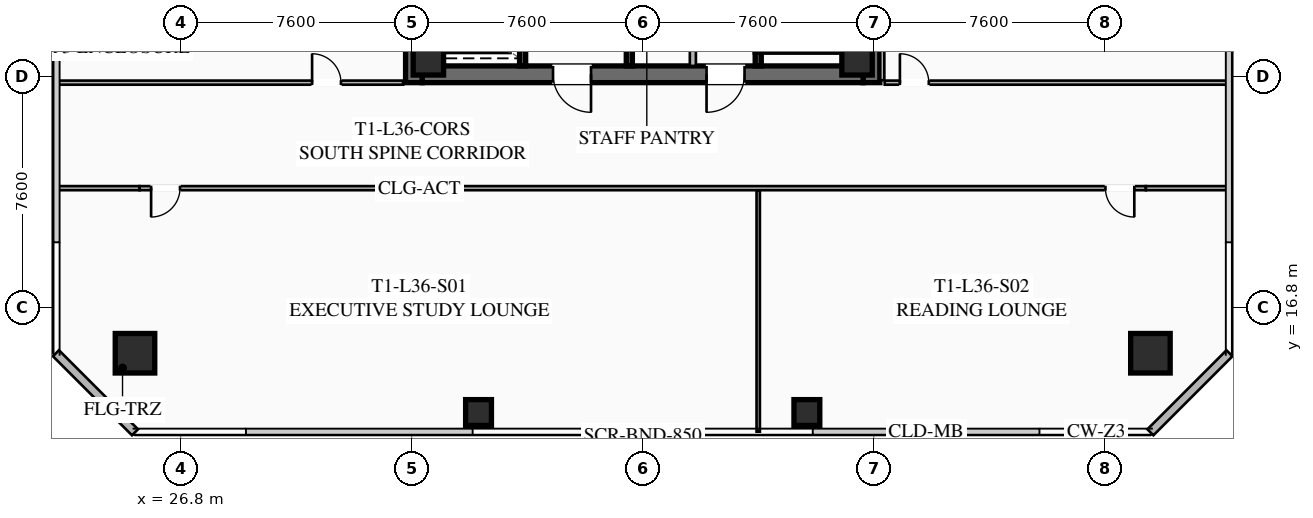
"""IFC4 building model, lengths in metres.
Left out: names, types, materials, properties, quantities, classifications, styles, units other than length and angle.
Written with IfcOpenShell. Run it as: python <this file> out.ifc"""

import sys

from ifc_helpers import new_model, si_unit, direction, frame, frame_2d, origin, origin_2d, place, context, subcontext, project, spatial, rectangle, hollow_rectangle, extrude, element, fill, save


model = new_model("IFC4")
c1 = context("Model", 3, precision=1e-05, world=origin(), true_north=direction((0.0, 1.0)))
c2 = subcontext(c1, "Body", "Model", "MODEL_VIEW")
j1 = project(units=[si_unit("LENGTHUNIT", "METRE"), si_unit("PLANEANGLEUNIT", "RADIAN")], contexts=[c1])
p1 = place(None, origin())
s1 = spatial("IfcSite", under=j1, at=p1, CompositionType="ELEMENT")
p2 = place(p1, origin())
s2 = spatial("IfcBuilding", under=s1, at=p2, CompositionType="ELEMENT")
p3 = place(p2, frame((0.0, 0.0, 135.7)))
s3 = spatial("IfcBuildingStorey", under=s2, at=p3, CompositionType="ELEMENT", Elevation=135.7)
for number, where, z_axis, x_axis in (
    (1, (34.475, 24.2, 0.0), (0.0, 0.0, 1.0), (0.0, 1.0, 0.0)),
    (2, (49.525, 39.8, 0.0), (0.0, 0.0, 1.0), (0.0, -1.0, 0.0)),
):
    element("IfcWall", number, at=place(p3, frame(where, z_axis=z_axis, x_axis=x_axis)), inside=s3, PredefinedType="SHEAR", context=c2, shape_type="SweptSolid", body=[
        extrude(rectangle(XDim=15.6, YDim=0.55, at=frame_2d((7.8, 0.0))), origin(), (0.0, 0.0, 1.0), 3.55),
    ])
p4 = place(p3, frame((49.25, 24.475, 0.0), z_axis=(0.0, 0.0, 1.0), x_axis=(-1.0, 0.0, 0.0)))
e3 = element("IfcWall", 3, at=p4, inside=s3, PredefinedType="SHEAR", context=c2, shape_type="SweptSolid", body=[
    extrude(rectangle(XDim=14.5, YDim=0.55, at=frame_2d((7.25, 0.0))), origin(), (0.0, 0.0, 1.0), 3.55),
])
p5 = place(p4, frame((8.95, 0.0, 0.0)))
e4 = element("IfcOpeningElement", 4, at=p5, cuts=e3, PredefinedType="OPENING", context=c2, shape_type="SweptSolid", body=[
    extrude(rectangle(XDim=1.25, YDim=2.25, at=frame_2d((0.625, 1.125))), frame((0.0, 0.285, 0.0), z_axis=(0.0, -1.0, 0.0), x_axis=(1.0, 0.0, 0.0)), (0.0, 0.0, 1.0), 0.57),
])
p6 = place(p4, frame((3.9, 0.0, 0.0)))
e5 = element("IfcOpeningElement", 5, at=p6, cuts=e3, PredefinedType="OPENING", context=c2, shape_type="SweptSolid", body=[
    extrude(rectangle(XDim=1.25, YDim=2.25, at=frame_2d((0.625, 1.125))), frame((0.0, 0.285, 0.0), z_axis=(0.0, -1.0, 0.0), x_axis=(1.0, 0.0, 0.0)), (0.0, 0.0, 1.0), 0.57),
])
for number, where, z_axis, x_axis in (
    (6, (34.95, 24.95, 0.0), (0.0, 0.0, 1.0), (1.0, 0.0, 0.0)),
    (7, (49.05, 24.95, 0.0), (0.0, 0.0, 1.0), (1.0, 0.0, 0.0)),
):
    element("IfcColumn", number, at=place(p3, frame(where, z_axis=z_axis, x_axis=x_axis)), inside=s3, PredefinedType="COLUMN", context=c2, shape_type="SweptSolid", body=[
        extrude(hollow_rectangle(XDim=1.0, YDim=1.0, WallThickness=0.04, at=origin_2d()), origin(), (0.0, 0.0, 1.0), 3.37),
    ])
for number, where, z_axis, x_axis in (
    (8, (25.3, 15.3, 0.0), (0.0, 0.0, 1.0), (1.0, 0.0, 0.0)),
    (9, (58.7, 15.3, 0.0), (0.0, 0.0, 1.0), (1.0, 0.0, 0.0)),
):
    element("IfcColumn", number, at=place(p3, frame(where, z_axis=z_axis, x_axis=x_axis)), inside=s3, PredefinedType="COLUMN", context=c2, shape_type="SweptSolid", body=[
        extrude(hollow_rectangle(XDim=1.3, YDim=1.3, WallThickness=0.05, at=origin_2d()), origin(), (0.0, 0.0, 1.0), 3.37),
    ])
for number, where, z_axis, x_axis in (
    (10, (36.6, 13.35, 0.0), (0.0, 0.0, 1.0), (1.0, 0.0, 0.0)),
    (11, (47.4, 13.35, 0.0), (0.0, 0.0, 1.0), (1.0, 0.0, 0.0)),
):
    element("IfcColumn", number, at=place(p3, frame(where, z_axis=z_axis, x_axis=x_axis)), inside=s3, PredefinedType="COLUMN", context=c2, shape_type="SweptSolid", body=[
        extrude(hollow_rectangle(XDim=0.85, YDim=0.85, WallThickness=0.035, at=origin_2d()), origin(), (0.0, 0.0, 1.0), 3.37),
    ])
for number, where, z_axis, x_axis in (
    (12, (25.3, 12.7, 0.0), (0.0, 0.0, 1.0), (-0.707, 0.707, 0.0)),
    (13, (61.3, 15.3, 0.0), (0.0, 0.0, 1.0), (-0.707, -0.707, 0.0)),
):
    element("IfcWall", number, at=place(p3, frame(where, z_axis=z_axis, x_axis=x_axis)), inside=s3, PredefinedType="SOLIDWALL", context=c2, shape_type="SweptSolid", body=[
        extrude(rectangle(XDim=3.677, YDim=0.28, at=frame_2d((1.838, 0.0))), origin(), (0.0, 0.0, 1.0), 3.37),
    ])
p7 = place(p3, frame((45.8, 32.8, 0.0), z_axis=(0.0, 0.0, 1.0), x_axis=(0.0, -1.0, 0.0)))
e14 = element("IfcWall", 14, at=p7, inside=s3, PredefinedType="SHEAR", context=c2, shape_type="SweptSolid", body=[
    extrude(rectangle(XDim=8.05, YDim=0.2, at=frame_2d((4.025, 0.0))), origin(), (0.0, 0.0, 1.0), 3.37),
])
p8 = place(p7, frame((0.45, 0.0, 0.0)))
e15 = element("IfcOpeningElement", 15, at=p8, cuts=e14, PredefinedType="OPENING", context=c2, shape_type="SweptSolid", body=[
    extrude(rectangle(XDim=1.15, YDim=2.2, at=frame_2d((0.575, 1.1))), frame((0.0, 0.11, 0.0), z_axis=(0.0, -1.0, 0.0), x_axis=(1.0, 0.0, 0.0)), (0.0, 0.0, 1.0), 0.22),
])
p9 = place(p3, frame((41.56, 24.75, 0.0), z_axis=(0.0, 0.0, 1.0), x_axis=(0.0, 1.0, 0.0)))
e16 = element("IfcWall", 16, at=p9, inside=s3, PredefinedType="SHEAR", context=c2, shape_type="SweptSolid", body=[
    extrude(rectangle(XDim=14.5, YDim=0.2, at=frame_2d((7.25, 0.0))), origin(), (0.0, 0.0, 1.0), 3.37),
])
p10 = place(p3, frame((38.05, 24.75, 0.0), z_axis=(0.0, 0.0, 1.0), x_axis=(0.0, 1.0, 0.0)))
e17 = element("IfcWall", 17, at=p10, inside=s3, PredefinedType="SHEAR", context=c2, shape_type="SweptSolid", body=[
    extrude(rectangle(XDim=6.45, YDim=0.2, at=frame_2d((3.225, 0.0))), origin(), (0.0, 0.0, 1.0), 3.37),
])
p11 = place(p10, frame((4.875, 0.0, 0.0)))
e18 = element("IfcOpeningElement", 18, at=p11, cuts=e17, PredefinedType="OPENING", context=c2, shape_type="SweptSolid", body=[
    extrude(rectangle(XDim=1.3, YDim=2.25, at=frame_2d((0.65, 1.125))), frame((0.0, 0.11, 0.0), z_axis=(0.0, -1.0, 0.0), x_axis=(1.0, 0.0, 0.0)), (0.0, 0.0, 1.0), 0.22),
])
p12 = place(p10, frame((2.875, 0.0, 0.0)))
e19 = element("IfcOpeningElement", 19, at=p12, cuts=e17, PredefinedType="OPENING", context=c2, shape_type="SweptSolid", body=[
    extrude(rectangle(XDim=1.3, YDim=2.25, at=frame_2d((0.65, 1.125))), frame((0.0, 0.11, 0.0), z_axis=(0.0, -1.0, 0.0), x_axis=(1.0, 0.0, 0.0)), (0.0, 0.0, 1.0), 0.22),
])
p13 = place(p10, frame((0.675, 0.0, 0.0)))
e20 = element("IfcOpeningElement", 20, at=p13, cuts=e17, PredefinedType="OPENING", context=c2, shape_type="SweptSolid", body=[
    extrude(rectangle(XDim=1.3, YDim=2.25, at=frame_2d((0.65, 1.125))), frame((0.0, 0.11, 0.0), z_axis=(0.0, -1.0, 0.0), x_axis=(1.0, 0.0, 0.0)), (0.0, 0.0, 1.0), 0.22),
])
p14 = place(p3, frame((43.65, 24.75, 0.0), z_axis=(0.0, 0.0, 1.0), x_axis=(0.0, 1.0, 0.0)))
e21 = element("IfcWall", 21, at=p14, inside=s3, PredefinedType="SOLIDWALL", context=c2, shape_type="SweptSolid", body=[
    extrude(rectangle(XDim=6.9, YDim=0.2, at=frame_2d((3.45, 0.0))), origin(), (0.0, 0.0, 1.0), 2.723),
])
p15 = place(p14, frame((0.85, 0.0, 0.0)))
e22 = element("IfcOpeningElement", 22, at=p15, cuts=e21, PredefinedType="OPENING", context=c2, shape_type="SweptSolid", body=[
    extrude(rectangle(XDim=0.95, YDim=2.05, at=frame_2d((0.475, 1.025))), frame((0.0, 0.11, 0.0), z_axis=(0.0, -1.0, 0.0), x_axis=(1.0, 0.0, 0.0)), (0.0, 0.0, 1.0), 0.22),
])
p16 = place(p14, frame((4.8, 0.0, 0.0)))
e23 = element("IfcOpeningElement", 23, at=p16, cuts=e21, PredefinedType="OPENING", context=c2, shape_type="SweptSolid", body=[
    extrude(rectangle(XDim=1.05, YDim=2.2, at=frame_2d((0.525, 1.1))), frame((0.0, 0.11, 0.0), z_axis=(0.0, -1.0, 0.0), x_axis=(1.0, 0.0, 0.0)), (0.0, 0.0, 1.0), 0.22),
])
p17 = place(p3, frame((58.55, 20.73, 0.0), z_axis=(0.0, 0.0, 1.0), x_axis=(-1.0, 0.0, 0.0)))
e24 = element("IfcWall", 24, at=p17, inside=s3, PredefinedType="PARTITIONING", context=c2, shape_type="SweptSolid", body=[
    extrude(rectangle(XDim=33.1, YDim=0.135, at=frame_2d((16.55, 0.0))), origin(), (0.0, 0.0, 1.0), 2.723),
])
p18 = place(p17, frame((31.77, 0.0, 0.0)))
e25 = element("IfcOpeningElement", 25, at=p18, cuts=e24, PredefinedType="OPENING", context=c2, shape_type="SweptSolid", body=[
    extrude(rectangle(XDim=0.95, YDim=2.05, at=frame_2d((0.475, 1.025))), frame((0.0, 0.077, 0.0), z_axis=(0.0, -1.0, 0.0), x_axis=(1.0, 0.0, 0.0)), (0.0, 0.0, 1.0), 0.155),
])
p19 = place(p17, frame((0.38, 0.0, 0.0)))
e26 = element("IfcOpeningElement", 26, at=p19, cuts=e24, PredefinedType="OPENING", context=c2, shape_type="SweptSolid", body=[
    extrude(rectangle(XDim=0.95, YDim=2.05, at=frame_2d((0.475, 1.025))), frame((0.0, 0.077, 0.0), z_axis=(0.0, -1.0, 0.0), x_axis=(1.0, 0.0, 0.0)), (0.0, 0.0, 1.0), 0.155),
])
for number, where, z_axis, x_axis in (
    (27, (22.72, 20.73, 0.0), (0.0, 0.0, 1.0), (1.0, 0.0, 0.0)),
    (28, (58.55, 20.73, 0.0), (0.0, 0.0, 1.0), (1.0, 0.0, 0.0)),
):
    element("IfcWall", number, at=place(p3, frame(where, z_axis=z_axis, x_axis=x_axis)), inside=s3, PredefinedType="PARTITIONING", context=c2, shape_type="SweptSolid", body=[
        extrude(rectangle(XDim=2.73, YDim=0.135, at=frame_2d((1.365, 0.0))), origin(), (0.0, 0.0, 1.0), 2.723),
    ])
p20 = place(p3, frame((45.8, 12.72, 0.0), z_axis=(0.0, 0.0, 1.0), x_axis=(0.0, 1.0, 0.0)))
e29 = element("IfcWall", 29, at=p20, inside=s3, PredefinedType="PARTITIONING", context=c2, shape_type="SweptSolid", body=[
    extrude(rectangle(XDim=7.93, YDim=0.11, at=frame_2d((3.965, 0.0))), origin(), (0.0, 0.0, 1.0), 2.723),
])
p21 = place(p3, frame((49.88, 39.72, 0.0), z_axis=(0.0, 0.0, 1.0), x_axis=(0.0, -1.0, 0.0)))
e30 = element("IfcWall", 30, at=p21, inside=s3, PredefinedType="PARTITIONING", context=c2, shape_type="SweptSolid", body=[
    extrude(rectangle(XDim=15.44, YDim=0.135, at=frame_2d((7.72, 0.0))), origin(), (0.0, 0.0, 1.0), 2.723),
])
p22 = place(p3, frame((49.96, 24.2, 0.0), z_axis=(0.0, 0.0, 1.0), x_axis=(1.0, 0.0, 0.0)))
e31 = element("IfcWall", 31, at=p22, inside=s3, PredefinedType="PARTITIONING", context=c2, shape_type="SweptSolid", body=[
    extrude(rectangle(XDim=11.32, YDim=0.135, at=frame_2d((5.66, 0.0))), origin(), (0.0, 0.0, 1.0), 2.723),
])
p23 = place(p22, frame((0.5, 0.0, 0.0)))
e32 = element("IfcOpeningElement", 32, at=p23, cuts=e31, PredefinedType="OPENING", context=c2, shape_type="SweptSolid", body=[
    extrude(rectangle(XDim=0.95, YDim=2.05, at=frame_2d((0.475, 1.025))), frame((0.0, 0.077, 0.0), z_axis=(0.0, -1.0, 0.0), x_axis=(1.0, 0.0, 0.0)), (0.0, 0.0, 1.0), 0.155),
])
p24 = place(p3, frame((22.72, 24.2, 0.0), z_axis=(0.0, 0.0, 1.0), x_axis=(1.0, 0.0, 0.0)))
e33 = element("IfcWall", 33, at=p24, inside=s3, PredefinedType="PARTITIONING", context=c2, shape_type="SweptSolid", body=[
    extrude(rectangle(XDim=11.4, YDim=0.135, at=frame_2d((5.7, 0.0))), origin(), (0.0, 0.0, 1.0), 2.723),
])
p25 = place(p24, frame((8.405, 0.0, 0.0)))
e34 = element("IfcOpeningElement", 34, at=p25, cuts=e33, PredefinedType="OPENING", context=c2, shape_type="SweptSolid", body=[
    extrude(rectangle(XDim=0.95, YDim=2.05, at=frame_2d((0.475, 1.025))), frame((0.0, 0.077, 0.0), z_axis=(0.0, -1.0, 0.0), x_axis=(1.0, 0.0, 0.0)), (0.0, 0.0, 1.0), 0.155),
])
p26 = place(p5, origin())
e35 = element("IfcDoor", 35, at=p26, inside=s3, OperationType="SINGLE_SWING_LEFT", PredefinedType="DOOR", context=c2, shape_type="SweptSolid", body=[
    extrude(rectangle(XDim=1.25, YDim=2.25, at=frame_2d((0.625, 1.125))), frame((0.0, 0.025, 0.0), z_axis=(0.0, -1.0, 0.0), x_axis=(1.0, 0.0, 0.0)), (0.0, 0.0, 1.0), 0.05),
])
fill(e4, e35)
p27 = place(p6, origin())
e36 = element("IfcDoor", 36, at=p27, inside=s3, OperationType="SINGLE_SWING_RIGHT", PredefinedType="DOOR", context=c2, shape_type="SweptSolid", body=[
    extrude(rectangle(XDim=1.25, YDim=2.25, at=frame_2d((0.625, 1.125))), frame((0.0, 0.025, 0.0), z_axis=(0.0, -1.0, 0.0), x_axis=(1.0, 0.0, 0.0)), (0.0, 0.0, 1.0), 0.05),
])
fill(e5, e36)
p28 = place(p18, origin())
e37 = element("IfcDoor", 37, at=p28, inside=s3, OperationType="SINGLE_SWING_RIGHT", PredefinedType="DOOR", context=c2, shape_type="SweptSolid", body=[
    extrude(rectangle(XDim=0.95, YDim=2.05, at=frame_2d((0.475, 1.025))), frame((0.0, 0.025, 0.0), z_axis=(0.0, -1.0, 0.0), x_axis=(1.0, 0.0, 0.0)), (0.0, 0.0, 1.0), 0.05),
])
fill(e25, e37)
p29 = place(p19, origin())
e38 = element("IfcDoor", 38, at=p29, inside=s3, OperationType="SINGLE_SWING_LEFT", PredefinedType="DOOR", context=c2, shape_type="SweptSolid", body=[
    extrude(rectangle(XDim=0.95, YDim=2.05, at=frame_2d((0.475, 1.025))), frame((0.0, 0.025, 0.0), z_axis=(0.0, -1.0, 0.0), x_axis=(1.0, 0.0, 0.0)), (0.0, 0.0, 1.0), 0.05),
])
fill(e26, e38)
p30 = place(p23, origin())
e39 = element("IfcDoor", 39, at=p30, inside=s3, OperationType="SINGLE_SWING_LEFT", PredefinedType="DOOR", context=c2, shape_type="SweptSolid", body=[
    extrude(rectangle(XDim=0.95, YDim=2.05, at=frame_2d((0.475, 1.025))), frame((0.0, 0.025, 0.0), z_axis=(0.0, -1.0, 0.0), x_axis=(1.0, 0.0, 0.0)), (0.0, 0.0, 1.0), 0.05),
])
fill(e32, e39)
p31 = place(p25, origin())
e40 = element("IfcDoor", 40, at=p31, inside=s3, OperationType="SINGLE_SWING_LEFT", PredefinedType="DOOR", context=c2, shape_type="SweptSolid", body=[
    extrude(rectangle(XDim=0.95, YDim=2.05, at=frame_2d((0.475, 1.025))), frame((0.0, 0.025, 0.0), z_axis=(0.0, -1.0, 0.0), x_axis=(1.0, 0.0, 0.0)), (0.0, 0.0, 1.0), 0.05),
])
fill(e34, e40)
save(model, sys.argv[1])
